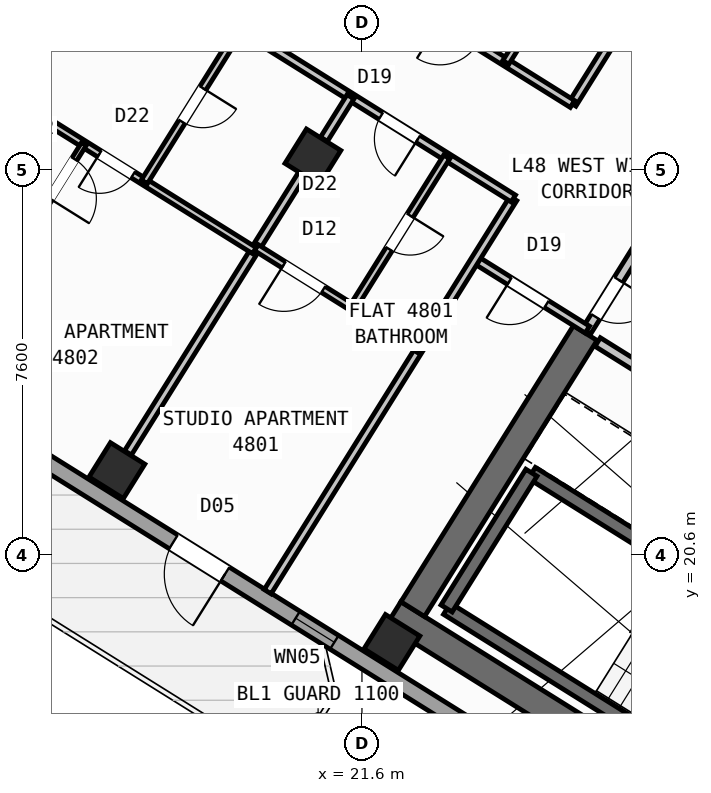
"""IFC4 building model, lengths in metres.
Left out: names, types, materials, properties, quantities, classifications, styles, units other than length and angle.
Written with IfcOpenShell. Run it as: python <this file> out.ifc"""

import sys

from ifc_helpers import new_model, si_unit, direction, frame, frame_2d, origin, origin_2d, place, context, subcontext, project, spatial, rectangle, hollow_rectangle, extrude, source, transform, mapped, element, fill, save


model = new_model("IFC4")
c1 = context("Model", 3, precision=1e-05, world=origin(), true_north=direction((0.0, 1.0)))
c2 = subcontext(c1, "Body", "Model", "MODEL_VIEW")
j1 = project(units=[si_unit("LENGTHUNIT", "METRE"), si_unit("PLANEANGLEUNIT", "RADIAN")], contexts=[c1])
p1 = place(None, origin())
s1 = spatial("IfcSite", under=j1, at=p1, CompositionType="ELEMENT")
p2 = place(p1, origin())
s2 = spatial("IfcBuilding", under=s1, at=p2, CompositionType="ELEMENT")
p3 = place(p2, frame((0.0, 0.0, 191.4)))
s3 = spatial("IfcBuildingStorey", under=s2, at=p3, CompositionType="ELEMENT", Elevation=191.4)
p4 = place(p3, frame((33.366, 12.477, 0.0), z_axis=(0.0, 0.0, 1.0), x_axis=(-0.848047359947, 0.529920442413, 0.0)))
e1 = element("IfcWall", 1, at=p4, inside=s3, PredefinedType="SHEAR", context=c2, shape_type="SweptSolid", body=[
    extrude(rectangle(XDim=13.14, YDim=0.55, at=frame_2d((6.57, 0.0))), origin(), (0.0, 0.0, 1.0), 3.32),
])
p5 = place(p3, frame((26.007, 24.976, 0.0), z_axis=(0.0, 0.0, 1.0), x_axis=(-0.529923795287, -0.848045264823, 0.0)))
e2 = element("IfcWall", 2, at=p5, inside=s3, PredefinedType="SHEAR", context=c2, shape_type="SweptSolid", body=[
    extrude(rectangle(XDim=6.425, YDim=0.55, at=frame_2d((3.212, 0.0))), origin(), (0.0, 0.0, 1.0), 3.32),
])
m1 = source(origin(), c2, "Body", "SweptSolid", [
    extrude(hollow_rectangle(XDim=0.8, YDim=0.8, WallThickness=0.032, at=origin_2d()), origin(), (0.0, 0.0, 1.0), 3.6),
])
for number, where, z_axis, x_axis in (
    (3, (22.191, 18.87, 0.0), (0.0, 0.0, 1.0), (-0.848, 0.53, 0.0)),
    (4, (20.632, 28.452, 0.0), (0.0, 0.0, 1.0), (-0.848, 0.53, 0.0)),
    (5, (16.764, 22.261, 0.0), (0.0, 0.0, 1.0), (-0.848, 0.53, 0.0)),
):
    element("IfcColumn", number, at=place(p3, frame(where, z_axis=z_axis, x_axis=x_axis)), inside=s3, PredefinedType="COLUMN", context=c2, shape_type="MappedRepresentation", body=[
        mapped(m1, transform((0.0, 0.0, 0.0), scale=1.0)),
    ])
p6 = place(p3, frame((31.76, 12.183, 0.0), z_axis=(0.0, 0.0, 1.0), x_axis=(-0.848047074256, 0.529920899612, 0.0)))
e6 = element("IfcWall", 6, at=p6, inside=s3, PredefinedType="STANDARD", context=c2, shape_type="SweptSolid", body=[
    extrude(rectangle(XDim=30.652, YDim=0.32, at=frame_2d((15.326, 0.0))), origin(), (0.0, 0.0, 1.0), 3.32),
])
p7 = place(p6, frame((15.166, 0.0, 0.0)))
e7 = element("IfcOpeningElement", 7, at=p7, cuts=e6, PredefinedType="OPENING", context=c2, shape_type="SweptSolid", body=[
    extrude(rectangle(XDim=1.2, YDim=2.15, at=frame_2d((0.6, 1.075))), frame((0.0, 0.17, 0.0), z_axis=(0.0, -1.0, 0.0), x_axis=(1.0, 0.0, 0.0)), (0.0, 0.0, 1.0), 0.34),
])
p8 = place(p6, frame((2.015, 0.0, 0.8)))
e8 = element("IfcOpeningElement", 8, at=p8, cuts=e6, PredefinedType="OPENING", context=c2, shape_type="SweptSolid", body=[
    extrude(rectangle(XDim=2.1, YDim=1.55, at=frame_2d((1.05, 0.775))), frame((0.0, 0.17, 0.0), z_axis=(0.0, -1.0, 0.0), x_axis=(1.0, 0.0, 0.0)), (0.0, 0.0, 1.0), 0.34),
])
p9 = place(p6, frame((7.244, 0.0, 0.8)))
e9 = element("IfcOpeningElement", 9, at=p9, cuts=e6, PredefinedType="OPENING", context=c2, shape_type="SweptSolid", body=[
    extrude(rectangle(XDim=2.1, YDim=1.55, at=frame_2d((1.05, 0.775))), frame((0.0, 0.17, 0.0), z_axis=(0.0, -1.0, 0.0), x_axis=(1.0, 0.0, 0.0)), (0.0, 0.0, 1.0), 0.34),
])
p10 = place(p6, frame((12.623, 0.0, 1.0)))
e10 = element("IfcOpeningElement", 10, at=p10, cuts=e6, PredefinedType="OPENING", context=c2, shape_type="SweptSolid", body=[
    extrude(rectangle(XDim=0.9, YDim=1.25, at=frame_2d((0.45, 0.625))), frame((0.0, 0.17, 0.0), z_axis=(0.0, -1.0, 0.0), x_axis=(1.0, 0.0, 0.0)), (0.0, 0.0, 1.0), 0.34),
])
p11 = place(p6, frame((19.565, 0.0, 0.95)))
e11 = element("IfcOpeningElement", 11, at=p11, cuts=e6, PredefinedType="OPENING", context=c2, shape_type="SweptSolid", body=[
    extrude(rectangle(XDim=1.2, YDim=1.4, at=frame_2d((0.6, 0.7))), frame((0.0, 0.17, 0.0), z_axis=(0.0, -1.0, 0.0), x_axis=(1.0, 0.0, 0.0)), (0.0, 0.0, 1.0), 0.34),
])
p12 = place(p6, frame((25.983, 0.0, 1.0)))
e12 = element("IfcOpeningElement", 12, at=p12, cuts=e6, PredefinedType="OPENING", context=c2, shape_type="SweptSolid", body=[
    extrude(rectangle(XDim=0.9, YDim=1.25, at=frame_2d((0.45, 0.625))), frame((0.0, 0.17, 0.0), z_axis=(0.0, -1.0, 0.0), x_axis=(1.0, 0.0, 0.0)), (0.0, 0.0, 1.0), 0.34),
])
p13 = place(p6, frame((28.433, 0.0, 1.0)))
e13 = element("IfcOpeningElement", 13, at=p13, cuts=e6, PredefinedType="OPENING", context=c2, shape_type="SweptSolid", body=[
    extrude(rectangle(XDim=0.9, YDim=1.25, at=frame_2d((0.45, 0.625))), frame((0.0, 0.17, 0.0), z_axis=(0.0, -1.0, 0.0), x_axis=(1.0, 0.0, 0.0)), (0.0, 0.0, 1.0), 0.34),
])
p14 = place(p3, frame((5.7, 28.71, 0.0), z_axis=(0.0, 0.0, 1.0), x_axis=(0.529923711467, 0.8480453172, 0.0)))
e14 = element("IfcWall", 14, at=p14, inside=s3, PredefinedType="STANDARD", context=c2, shape_type="SweptSolid", body=[
    extrude(rectangle(XDim=21.587, YDim=0.32, at=frame_2d((10.794, 0.0))), origin(), (0.0, 0.0, 1.0), 2.795),
])
p15 = place(p14, frame((1.44, 0.0, 0.95)))
e15 = element("IfcOpeningElement", 15, at=p15, cuts=e14, PredefinedType="OPENING", context=c2, shape_type="SweptSolid", body=[
    extrude(rectangle(XDim=1.2, YDim=1.4, at=frame_2d((0.6, 0.7))), frame((0.0, 0.17, 0.0), z_axis=(0.0, -1.0, 0.0), x_axis=(1.0, 0.0, 0.0)), (0.0, 0.0, 1.0), 0.34),
])
p16 = place(p14, frame((4.545, 0.0, 0.85)))
e16 = element("IfcOpeningElement", 16, at=p16, cuts=e14, PredefinedType="OPENING", context=c2, shape_type="SweptSolid", body=[
    extrude(rectangle(XDim=1.8, YDim=1.5, at=frame_2d((0.9, 0.75))), frame((0.0, 0.17, 0.0), z_axis=(0.0, -1.0, 0.0), x_axis=(1.0, 0.0, 0.0)), (0.0, 0.0, 1.0), 0.34),
])
p17 = place(p14, frame((12.139, 0.0, 1.0)))
e17 = element("IfcOpeningElement", 17, at=p17, cuts=e14, PredefinedType="OPENING", context=c2, shape_type="SweptSolid", body=[
    extrude(rectangle(XDim=0.9, YDim=1.25, at=frame_2d((0.45, 0.625))), frame((0.0, 0.17, 0.0), z_axis=(0.0, -1.0, 0.0), x_axis=(1.0, 0.0, 0.0)), (0.0, 0.0, 1.0), 0.34),
])
p18 = place(p14, frame((16.35, 0.0, 0.95)))
e18 = element("IfcOpeningElement", 18, at=p18, cuts=e14, PredefinedType="OPENING", context=c2, shape_type="SweptSolid", body=[
    extrude(rectangle(XDim=1.2, YDim=1.4, at=frame_2d((0.6, 0.7))), frame((0.0, 0.17, 0.0), z_axis=(0.0, -1.0, 0.0), x_axis=(1.0, 0.0, 0.0)), (0.0, 0.0, 1.0), 0.34),
])
p19 = place(p14, frame((18.762, 0.0, 0.95)))
e19 = element("IfcOpeningElement", 19, at=p19, cuts=e14, PredefinedType="OPENING", context=c2, shape_type="SweptSolid", body=[
    extrude(rectangle(XDim=1.2, YDim=1.4, at=frame_2d((0.6, 0.7))), frame((0.0, 0.17, 0.0), z_axis=(0.0, -1.0, 0.0), x_axis=(1.0, 0.0, 0.0)), (0.0, 0.0, 1.0), 0.34),
])
p20 = place(p3, frame((29.605, 15.581, 0.0), z_axis=(0.0, 0.0, 1.0), x_axis=(-0.848036911448, 0.529937163087, 0.0)))
e20 = element("IfcWall", 20, at=p20, inside=s3, PredefinedType="SHEAR", context=c2, shape_type="SweptSolid", body=[
    extrude(rectangle(XDim=7.46, YDim=0.26, at=frame_2d((3.73, 0.0))), origin(), (0.0, 0.0, 1.0), 3.32),
])
p21 = place(p3, frame((31.28, 18.261, 0.0), z_axis=(0.0, 0.0, 1.0), x_axis=(-0.848051618787, 0.529913626805, 0.0)))
e21 = element("IfcWall", 21, at=p21, inside=s3, PredefinedType="SHEAR", context=c2, shape_type="SweptSolid", body=[
    extrude(rectangle(XDim=7.46, YDim=0.26, at=frame_2d((3.73, 0.0))), origin(), (0.0, 0.0, 1.0), 3.32),
])
p22 = place(p21, frame((0.36, 0.0, 0.0)))
e22 = element("IfcOpeningElement", 22, at=p22, cuts=e21, PredefinedType="OPENING", context=c2, shape_type="SweptSolid", body=[
    extrude(rectangle(XDim=0.86, YDim=2.05, at=frame_2d((0.43, 1.025))), frame((0.0, 0.14, 0.0), z_axis=(0.0, -1.0, 0.0), x_axis=(1.0, 0.0, 0.0)), (0.0, 0.0, 1.0), 0.28),
])
p23 = place(p3, frame((24.945, 22.22, 0.0), z_axis=(0.0, 0.0, 1.0), x_axis=(-0.529908658664, -0.84805472316, 0.0)))
e23 = element("IfcWall", 23, at=p23, inside=s3, PredefinedType="SHEAR", context=c2, shape_type="SweptSolid", body=[
    extrude(rectangle(XDim=3.16, YDim=0.26, at=frame_2d((1.58, 0.0))), origin(), (0.0, 0.0, 1.0), 3.32),
])
p24 = place(p3, frame((31.525, 21.504, 0.0), z_axis=(0.0, 0.0, 1.0), x_axis=(-0.848040211232, 0.529931882541, 0.0)))
e24 = element("IfcWall", 24, at=p24, inside=s3, PredefinedType="STANDARD", context=c2, shape_type="SweptSolid", body=[
    extrude(rectangle(XDim=6.218, YDim=0.2, at=frame_2d((3.109, 0.0))), origin(), (0.0, 0.0, 1.0), 3.31),
])
p25 = place(p24, frame((4.4, 0.0, 0.0)))
e25 = element("IfcOpeningElement", 25, at=p25, cuts=e24, PredefinedType="OPENING", context=c2, shape_type="SweptSolid", body=[
    extrude(rectangle(XDim=0.86, YDim=2.05, at=frame_2d((0.43, 1.025))), frame((0.0, 0.11, 0.0), z_axis=(0.0, -1.0, 0.0), x_axis=(1.0, 0.0, 0.0)), (0.0, 0.0, 1.0), 0.22),
])
p26 = place(p24, frame((1.45, 0.0, 0.0)))
e26 = element("IfcOpeningElement", 26, at=p26, cuts=e24, PredefinedType="OPENING", context=c2, shape_type="SweptSolid", body=[
    extrude(rectangle(XDim=0.86, YDim=2.05, at=frame_2d((0.43, 1.025))), frame((0.0, 0.11, 0.0), z_axis=(0.0, -1.0, 0.0), x_axis=(1.0, 0.0, 0.0)), (0.0, 0.0, 1.0), 0.22),
])
p27 = place(p3, frame((27.596, 27.52, 0.0), z_axis=(0.0, 0.0, 1.0), x_axis=(-0.529865479138, -0.848081702443, 0.0)))
e27 = element("IfcWall", 27, at=p27, inside=s3, PredefinedType="STANDARD", context=c2, shape_type="SweptSolid", body=[
    extrude(rectangle(XDim=2.96, YDim=0.2, at=frame_2d((1.48, 0.0))), origin(), (0.0, 0.0, 1.0), 3.31),
])
p28 = place(p27, frame((1.76, 0.0, 0.0)))
e28 = element("IfcOpeningElement", 28, at=p28, cuts=e27, PredefinedType="OPENING", context=c2, shape_type="SweptSolid", body=[
    extrude(rectangle(XDim=0.86, YDim=2.05, at=frame_2d((0.43, 1.025))), frame((0.0, 0.11, 0.0), z_axis=(0.0, -1.0, 0.0), x_axis=(1.0, 0.0, 0.0)), (0.0, 0.0, 1.0), 0.22),
])
p29 = place(p3, frame((26.049, 25.044, 0.0), z_axis=(0.0, 0.0, 1.0), x_axis=(-0.848050851465, 0.529914854792, 0.0)))
e29 = element("IfcWall", 29, at=p29, inside=s3, PredefinedType="PARTITIONING", context=c2, shape_type="SweptSolid", body=[
    extrude(rectangle(XDim=2.61, YDim=0.16, at=frame_2d((1.305, 0.0))), origin(), (0.0, 0.0, 1.0), 2.795),
])
p30 = place(p29, frame((0.95, 0.0, 0.0)))
e30 = element("IfcOpeningElement", 30, at=p30, cuts=e29, PredefinedType="OPENING", context=c2, shape_type="SweptSolid", body=[
    extrude(rectangle(XDim=0.86, YDim=2.05, at=frame_2d((0.43, 1.025))), frame((0.0, 0.09, 0.0), z_axis=(0.0, -1.0, 0.0), x_axis=(1.0, 0.0, 0.0)), (0.0, 0.0, 1.0), 0.18),
])
p31 = place(p3, frame((31.239, 38.274, 0.0), z_axis=(0.0, 0.0, 1.0), x_axis=(-0.529914125013, -0.848051307476, 0.0)))
e31 = element("IfcWall", 31, at=p31, inside=s3, PredefinedType="PARTITIONING", context=c2, shape_type="SweptSolid", body=[
    extrude(rectangle(XDim=10.35, YDim=0.16, at=frame_2d((5.175, 0.0))), origin(), (0.0, 0.0, 1.0), 3.31),
])
p32 = place(p3, frame((24.588, 27.631, 0.0), z_axis=(0.0, 0.0, 1.0), x_axis=(-0.529914992377, -0.848050765494, 0.0)))
e32 = element("IfcWall", 32, at=p32, inside=s3, PredefinedType="PARTITIONING", context=c2, shape_type="SweptSolid", body=[
    extrude(rectangle(XDim=9.15, YDim=0.16, at=frame_2d((4.575, 0.0))), origin(), (0.0, 0.0, 1.0), 3.31),
])
p33 = place(p3, frame((25.754, 29.497, 0.0), z_axis=(0.0, 0.0, 1.0), x_axis=(-0.848045850158, 0.529922858565, 0.0)))
e33 = element("IfcWall", 33, at=p33, inside=s3, PredefinedType="PARTITIONING", context=c2, shape_type="SweptSolid", body=[
    extrude(rectangle(XDim=16.73, YDim=0.16, at=frame_2d((8.365, 0.0))), origin(), (0.0, 0.0, 1.0), 3.31),
])
p34 = place(p33, frame((2.22, 0.0, 0.0)))
e34 = element("IfcOpeningElement", 34, at=p34, cuts=e33, PredefinedType="OPENING", context=c2, shape_type="SweptSolid", body=[
    extrude(rectangle(XDim=0.86, YDim=2.05, at=frame_2d((0.43, 1.025))), frame((0.0, 0.09, 0.0), z_axis=(0.0, -1.0, 0.0), x_axis=(1.0, 0.0, 0.0)), (0.0, 0.0, 1.0), 0.18),
])
p35 = place(p33, frame((6.49, 0.0, 0.0)))
e35 = element("IfcOpeningElement", 35, at=p35, cuts=e33, PredefinedType="OPENING", context=c2, shape_type="SweptSolid", body=[
    extrude(rectangle(XDim=1.0, YDim=2.1, at=frame_2d((0.5, 1.05))), frame((0.0, 0.09, 0.0), z_axis=(0.0, -1.0, 0.0), x_axis=(1.0, 0.0, 0.0)), (0.0, 0.0, 1.0), 0.18),
])
p36 = place(p33, frame((14.304, 0.0, 0.0)))
e36 = element("IfcOpeningElement", 36, at=p36, cuts=e33, PredefinedType="OPENING", context=c2, shape_type="SweptSolid", body=[
    extrude(rectangle(XDim=1.0, YDim=2.1, at=frame_2d((0.5, 1.05))), frame((0.0, 0.09, 0.0), z_axis=(0.0, -1.0, 0.0), x_axis=(1.0, 0.0, 0.0)), (0.0, 0.0, 1.0), 0.18),
])
p37 = place(p3, frame((24.588, 27.631, 0.0), z_axis=(0.0, 0.0, 1.0), x_axis=(-0.848041752158, 0.529929416617, 0.0)))
e37 = element("IfcWall", 37, at=p37, inside=s3, PredefinedType="PARTITIONING", context=c2, shape_type="SweptSolid", body=[
    extrude(rectangle(XDim=16.73, YDim=0.16, at=frame_2d((8.365, 0.0))), origin(), (0.0, 0.0, 1.0), 3.31),
])
p38 = place(p37, frame((2.22, 0.0, 0.0)))
e38 = element("IfcOpeningElement", 38, at=p38, cuts=e37, PredefinedType="OPENING", context=c2, shape_type="SweptSolid", body=[
    extrude(rectangle(XDim=0.86, YDim=2.05, at=frame_2d((0.43, 1.025))), frame((0.0, 0.09, 0.0), z_axis=(0.0, -1.0, 0.0), x_axis=(1.0, 0.0, 0.0)), (0.0, 0.0, 1.0), 0.18),
])
p39 = place(p37, frame((7.82, 0.0, 0.0)))
e39 = element("IfcOpeningElement", 39, at=p39, cuts=e37, PredefinedType="OPENING", context=c2, shape_type="SweptSolid", body=[
    extrude(rectangle(XDim=1.0, YDim=2.1, at=frame_2d((0.5, 1.05))), frame((0.0, 0.09, 0.0), z_axis=(0.0, -1.0, 0.0), x_axis=(1.0, 0.0, 0.0)), (0.0, 0.0, 1.0), 0.18),
])
p40 = place(p37, frame((12.95, 0.0, 0.0)))
e40 = element("IfcOpeningElement", 40, at=p40, cuts=e37, PredefinedType="OPENING", context=c2, shape_type="SweptSolid", body=[
    extrude(rectangle(XDim=1.0, YDim=2.1, at=frame_2d((0.5, 1.05))), frame((0.0, 0.09, 0.0), z_axis=(0.0, -1.0, 0.0), x_axis=(1.0, 0.0, 0.0)), (0.0, 0.0, 1.0), 0.18),
])
p41 = place(p3, frame((21.374, 29.639, 0.0), z_axis=(0.0, 0.0, 1.0), x_axis=(-0.529998940003, -0.847998304005, 0.0)))
e41 = element("IfcWall", 41, at=p41, inside=s3, PredefinedType="PARTITIONING", context=c2, shape_type="SweptSolid", body=[
    extrude(rectangle(XDim=0.988, YDim=0.16, at=frame_2d((0.494, 0.0))), origin(), (0.0, 0.0, 1.0), 2.795),
])
p42 = place(p3, frame((20.414, 28.103, 0.0), z_axis=(0.0, 0.0, 1.0), x_axis=(-0.529934553702, -0.848038542045, 0.0)))
e42 = element("IfcWall", 42, at=p42, inside=s3, PredefinedType="PARTITIONING", context=c2, shape_type="SweptSolid", body=[
    extrude(rectangle(XDim=6.476, YDim=0.16, at=frame_2d((3.238, 0.0))), origin(), (0.0, 0.0, 1.0), 2.795),
])
p43 = place(p3, frame((22.728, 24.654, 0.0), z_axis=(0.0, 0.0, 1.0), x_axis=(-0.848059820872, 0.529900500304, 0.0)))
e43 = element("IfcWall", 43, at=p43, inside=s3, PredefinedType="PLUMBINGWALL", context=c2, shape_type="SweptSolid", body=[
    extrude(rectangle(XDim=3.79, YDim=0.14, at=frame_2d((1.895, 0.0))), origin(), (0.0, 0.0, 1.0), 3.31),
])
p44 = place(p43, frame((2.23, 0.0, 0.0)))
e44 = element("IfcOpeningElement", 44, at=p44, cuts=e43, PredefinedType="OPENING", context=c2, shape_type="SweptSolid", body=[
    extrude(rectangle(XDim=0.92, YDim=2.08, at=frame_2d((0.46, 1.04))), frame((0.0, 0.08, 0.0), z_axis=(0.0, -1.0, 0.0), x_axis=(1.0, 0.0, 0.0)), (0.0, 0.0, 1.0), 0.16),
])
p45 = place(p3, frame((23.273, 28.452, 0.0), z_axis=(0.0, 0.0, 1.0), x_axis=(-0.529867639402, -0.848080352747, 0.0)))
e45 = element("IfcWall", 45, at=p45, inside=s3, PredefinedType="PLUMBINGWALL", context=c2, shape_type="SweptSolid", body=[
    extrude(rectangle(XDim=3.51, YDim=0.14, at=frame_2d((1.755, 0.0))), origin(), (0.0, 0.0, 1.0), 2.935),
])
p46 = place(p45, frame((1.365, 0.0, 0.0)))
e46 = element("IfcOpeningElement", 46, at=p46, cuts=e45, PredefinedType="OPENING", context=c2, shape_type="SweptSolid", body=[
    extrude(rectangle(XDim=0.78, YDim=2.05, at=frame_2d((0.39, 1.025))), frame((0.0, 0.08, 0.0), z_axis=(0.0, -1.0, 0.0), x_axis=(1.0, 0.0, 0.0)), (0.0, 0.0, 1.0), 0.16),
])
p47 = place(p3, frame((19.477, 26.603, 0.0), z_axis=(0.0, 0.0, 1.0), x_axis=(-0.848039019877, 0.529933789039, 0.0)))
e47 = element("IfcWall", 47, at=p47, inside=s3, PredefinedType="PLUMBINGWALL", context=c2, shape_type="SweptSolid", body=[
    extrude(rectangle(XDim=6.4, YDim=0.14, at=frame_2d((3.2, 0.0))), origin(), (0.0, 0.0, 1.0), 3.31),
])
p48 = place(p47, frame((2.824, 0.0, 0.0)))
e48 = element("IfcOpeningElement", 48, at=p48, cuts=e47, PredefinedType="OPENING", context=c2, shape_type="SweptSolid", body=[
    extrude(rectangle(XDim=0.78, YDim=2.05, at=frame_2d((0.39, 1.025))), frame((0.0, 0.08, 0.0), z_axis=(0.0, -1.0, 0.0), x_axis=(1.0, 0.0, 0.0)), (0.0, 0.0, 1.0), 0.16),
])
p49 = place(p3, frame((19.203, 30.996, 0.0), z_axis=(0.0, 0.0, 1.0), x_axis=(-0.529906983049, -0.848055770169, 0.0)))
e49 = element("IfcWall", 49, at=p49, inside=s3, PredefinedType="PLUMBINGWALL", context=c2, shape_type="SweptSolid", body=[
    extrude(rectangle(XDim=3.58, YDim=0.14, at=frame_2d((1.79, 0.0))), origin(), (0.0, 0.0, 1.0), 3.31),
])
p50 = place(p49, frame((1.4, 0.0, 0.0)))
e50 = element("IfcOpeningElement", 50, at=p50, cuts=e49, PredefinedType="OPENING", context=c2, shape_type="SweptSolid", body=[
    extrude(rectangle(XDim=0.78, YDim=2.05, at=frame_2d((0.39, 1.025))), frame((0.0, 0.08, 0.0), z_axis=(0.0, -1.0, 0.0), x_axis=(1.0, 0.0, 0.0)), (0.0, 0.0, 1.0), 0.16),
])
p51 = place(p3, frame((16.112, 28.706, 0.0), z_axis=(0.0, 0.0, 1.0), x_axis=(-0.529916267533, -0.848049968695, 0.0)))
e51 = element("IfcWall", 51, at=p51, inside=s3, PredefinedType="PARTITIONING", context=c2, shape_type="SweptSolid", body=[
    extrude(rectangle(XDim=5.84, YDim=0.11, at=frame_2d((2.92, 0.0))), origin(), (0.0, 0.0, 1.0), 3.31),
])
p52 = place(p51, frame((0.35, 0.0, 0.0)))
e52 = element("IfcOpeningElement", 52, at=p52, cuts=e51, PredefinedType="OPENING", context=c2, shape_type="SweptSolid", body=[
    extrude(rectangle(XDim=0.92, YDim=2.08, at=frame_2d((0.46, 1.04))), frame((0.0, 0.065, 0.0), z_axis=(0.0, -1.0, 0.0), x_axis=(1.0, 0.0, 0.0)), (0.0, 0.0, 1.0), 0.13),
])
p53 = place(p3, frame((27.359, 34.991, 0.0), z_axis=(0.0, 0.0, 1.0), x_axis=(-0.529907329021, -0.848055553988, 0.0)))
e53 = element("IfcWall", 53, at=p53, inside=s3, PredefinedType="PLUMBINGWALL", context=c2, shape_type="SweptSolid", body=[
    extrude(rectangle(XDim=5.51, YDim=0.14, at=frame_2d((2.755, 0.0))), origin(), (0.0, 0.0, 1.0), 2.935),
])
p54 = place(p53, frame((2.365, 0.0, 0.0)))
e54 = element("IfcOpeningElement", 54, at=p54, cuts=e53, PredefinedType="OPENING", context=c2, shape_type="SweptSolid", body=[
    extrude(rectangle(XDim=0.78, YDim=2.05, at=frame_2d((0.39, 1.025))), frame((0.0, 0.08, 0.0), z_axis=(0.0, -1.0, 0.0), x_axis=(1.0, 0.0, 0.0)), (0.0, 0.0, 1.0), 0.16),
])
m2 = source(origin(), c2, "Body", "SweptSolid", [
    extrude(rectangle(XDim=1.2, YDim=2.15, at=frame_2d((0.6, 1.075))), frame((0.0, 0.025, 0.0), z_axis=(0.0, -1.0, 0.0), x_axis=(1.0, 0.0, 0.0)), (0.0, 0.0, 1.0), 0.05),
])
p55 = place(p7, origin())
e55 = element("IfcDoor", 55, at=p55, inside=s3, OperationType="SINGLE_SWING_LEFT", PredefinedType="DOOR", context=c2, shape_type="MappedRepresentation", body=[
    mapped(m2, transform((0.0, 0.0, 0.0), scale=1.0)),
])
fill(e7, e55)
m3 = source(origin(), c2, "Body", "SweptSolid", [
    extrude(rectangle(XDim=0.9, YDim=1.25, at=frame_2d((0.45, 0.625))), frame((0.0, 0.03, 0.0), z_axis=(0.0, -1.0, 0.0), x_axis=(1.0, 0.0, 0.0)), (0.0, 0.0, 1.0), 0.06),
])
p56 = place(p10, origin())
e56 = element("IfcWindow", 56, at=p56, inside=s3, PartitioningType="SINGLE_PANEL", PredefinedType="WINDOW", context=c2, shape_type="MappedRepresentation", body=[
    mapped(m3, transform((0.0, 0.0, 0.0), scale=1.0)),
])
fill(e10, e56)
m4 = source(origin(), c2, "Body", "SweptSolid", [
    extrude(rectangle(XDim=0.86, YDim=2.05, at=frame_2d((0.43, 1.025))), frame((0.0, 0.025, 0.0), z_axis=(0.0, -1.0, 0.0), x_axis=(1.0, 0.0, 0.0)), (0.0, 0.0, 1.0), 0.05),
])
p57 = place(p30, origin())
e57 = element("IfcDoor", 57, at=p57, inside=s3, OperationType="SINGLE_SWING_RIGHT", PredefinedType="DOOR", context=c2, shape_type="MappedRepresentation", body=[
    mapped(m4, transform((0.0, 0.0, 0.0), scale=1.0)),
])
fill(e30, e57)
p58 = place(p28, origin())
e58 = element("IfcDoor", 58, at=p58, inside=s3, OperationType="SINGLE_SWING_LEFT", PredefinedType="DOOR", context=c2, shape_type="MappedRepresentation", body=[
    mapped(m4, transform((0.0, 0.0, 0.0), scale=1.0)),
])
fill(e28, e58)
p59 = place(p38, origin())
e59 = element("IfcDoor", 59, at=p59, inside=s3, OperationType="SINGLE_SWING_LEFT", PredefinedType="DOOR", context=c2, shape_type="MappedRepresentation", body=[
    mapped(m4, transform((0.0, 0.0, 0.0), scale=1.0)),
])
fill(e38, e59)
m5 = source(origin(), c2, "Body", "SweptSolid", [
    extrude(rectangle(XDim=0.92, YDim=2.08, at=frame_2d((0.46, 1.04))), frame((0.0, 0.025, 0.0), z_axis=(0.0, -1.0, 0.0), x_axis=(1.0, 0.0, 0.0)), (0.0, 0.0, 1.0), 0.05),
])
p60 = place(p44, origin())
e60 = element("IfcDoor", 60, at=p60, inside=s3, OperationType="SINGLE_SWING_RIGHT", PredefinedType="DOOR", context=c2, shape_type="MappedRepresentation", body=[
    mapped(m5, transform((0.0, 0.0, 0.0), scale=1.0)),
])
fill(e44, e60)
m6 = source(origin(), c2, "Body", "SweptSolid", [
    extrude(rectangle(XDim=0.78, YDim=2.05, at=frame_2d((0.39, 1.025))), frame((0.0, 0.025, 0.0), z_axis=(0.0, -1.0, 0.0), x_axis=(1.0, 0.0, 0.0)), (0.0, 0.0, 1.0), 0.05),
])
p61 = place(p46, origin())
e61 = element("IfcDoor", 61, at=p61, inside=s3, OperationType="SINGLE_SWING_LEFT", PredefinedType="DOOR", context=c2, shape_type="MappedRepresentation", body=[
    mapped(m6, transform((0.0, 0.0, 0.0), scale=1.0)),
])
fill(e46, e61)
p62 = place(p52, origin())
e62 = element("IfcDoor", 62, at=p62, inside=s3, OperationType="SINGLE_SWING_RIGHT", PredefinedType="DOOR", context=c2, shape_type="MappedRepresentation", body=[
    mapped(m5, transform((0.0, 0.0, 0.0), scale=1.0)),
])
fill(e52, e62)
p63 = place(p48, origin())
e63 = element("IfcDoor", 63, at=p63, inside=s3, OperationType="SINGLE_SWING_RIGHT", PredefinedType="DOOR", context=c2, shape_type="MappedRepresentation", body=[
    mapped(m6, transform((0.0, 0.0, 0.0), scale=1.0)),
])
fill(e48, e63)
p64 = place(p50, origin())
e64 = element("IfcDoor", 64, at=p64, inside=s3, OperationType="SINGLE_SWING_LEFT", PredefinedType="DOOR", context=c2, shape_type="MappedRepresentation", body=[
    mapped(m6, transform((0.0, 0.0, 0.0), scale=1.0)),
])
fill(e50, e64)
save(model, sys.argv[1])
